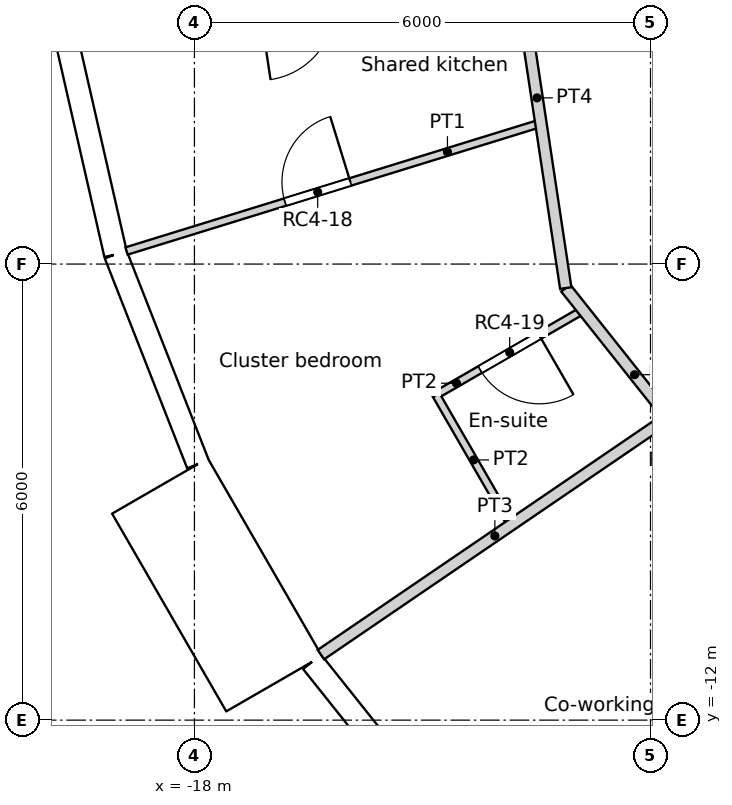
"""IFC4 building model, lengths in metres.
Left out: names, types, materials, properties, quantities, classifications, styles, units other than length and angle.
Written with IfcOpenShell. Run it as: python <this file> out.ifc"""

import sys

from ifc_helpers import new_model, si_unit, direction, frame, frame_2d, origin, origin_2d, place, context, subcontext, project, spatial, rectangle, circle, extrude, element, fill, save


model = new_model("IFC4")
c1 = context("Model", 3, precision=1e-05, world=origin(), true_north=direction((0.0, 1.0)))
c2 = subcontext(c1, "Body", "Model", "MODEL_VIEW")
j1 = project(units=[si_unit("LENGTHUNIT", "METRE"), si_unit("PLANEANGLEUNIT", "RADIAN")], contexts=[c1])
p1 = place(None, origin())
s1 = spatial("IfcSite", under=j1, at=p1, CompositionType="ELEMENT")
p2 = place(p1, origin())
s2 = spatial("IfcBuilding", under=s1, at=p2, CompositionType="ELEMENT")
p3 = place(p2, frame((0.0, 0.0, 263.4)))
s3 = spatial("IfcBuildingStorey", under=s2, at=p3, CompositionType="ELEMENT", Elevation=263.4)
for number, where, z_axis, x_axis in (
    (1, (-18.612, -2.805, 0.0), (0.0, 0.0, 1.0), (1.0, 0.0, 0.0)),
    (2, (-16.958, -8.167, 0.0), (0.0, 0.0, 1.0), (1.0, 0.0, 0.0)),
):
    element("IfcColumn", number, at=place(p3, frame(where, z_axis=z_axis, x_axis=x_axis)), inside=s3, PredefinedType="COLUMN", context=c2, shape_type="SweptSolid", body=[
        extrude(circle(Radius=0.55, at=origin_2d()), origin(), (0.0, 0.0, 1.0), 3.6),
    ])
p4 = place(p3, frame((-19.696, -2.984, 0.0), z_axis=(0.0, 0.0, 1.0), x_axis=(0.222529389789, -0.974925982155, 0.0)))
e3 = element("IfcWall", 3, at=p4, inside=s3, PredefinedType="SOLIDWALL", context=c2, shape_type="SweptSolid", body=[
    extrude(rectangle(XDim=2.962, YDim=0.3, at=frame_2d((1.481, 0.0))), origin(), (0.0, 0.0, 1.0), 3.25),
])
p5 = place(p4, frame((1.481, 0.0, 1.55)))
e4 = element("IfcOpeningElement", 4, at=p5, cuts=e3, PredefinedType="OPENING", context=c2, shape_type="SweptSolid", body=[
    extrude(circle(Radius=0.9, at=origin_2d()), frame((0.0, 0.16, 0.0), z_axis=(0.0, -1.0, 0.0), x_axis=(1.0, 0.0, 0.0)), (0.0, 0.0, 1.0), 0.32),
])
p6 = place(p3, frame((-19.037, -5.872, 0.0), z_axis=(0.0, 0.0, 1.0), x_axis=(0.36530043032, -0.930889679612, 0.0)))
e5 = element("IfcWall", 5, at=p6, inside=s3, PredefinedType="SOLIDWALL", context=c2, shape_type="SweptSolid", body=[
    extrude(rectangle(XDim=2.962, YDim=0.3, at=frame_2d((1.481, 0.0))), origin(), (0.0, 0.0, 1.0), 3.25),
])
p7 = place(p6, frame((1.481, 0.0, 1.55)))
e6 = element("IfcOpeningElement", 6, at=p7, cuts=e5, PredefinedType="OPENING", context=c2, shape_type="SweptSolid", body=[
    extrude(circle(Radius=0.9, at=origin_2d()), frame((0.0, 0.16, 0.0), z_axis=(0.0, -1.0, 0.0), x_axis=(1.0, 0.0, 0.0)), (0.0, 0.0, 1.0), 0.32),
])
p8 = place(p3, frame((-18.452, -8.921, -0.35), z_axis=(0.0, 0.0, 1.0), x_axis=(0.499990139034, -0.866031096941, 0.0)))
e7 = element("IfcWall", 7, at=p8, inside=s3, PredefinedType="ELEMENTEDWALL", context=c2, shape_type="SweptSolid", body=[
    extrude(rectangle(XDim=3.0, YDim=1.45, at=frame_2d((1.5, 0.0))), origin(), (0.0, 0.0, 1.0), 3.6),
])
p9 = place(p8, frame((1.5, 0.0, 1.9)))
e8 = element("IfcOpeningElement", 8, at=p9, cuts=e7, PredefinedType="OPENING", context=c2, shape_type="SweptSolid", body=[
    extrude(circle(Radius=0.9, at=origin_2d()), frame((0.0, 0.735, 0.0), z_axis=(0.0, -1.0, 0.0), x_axis=(1.0, 0.0, 0.0)), (0.0, 0.0, 1.0), 1.47),
])
p10 = place(p3, frame((-16.451, -11.234, 0.0), z_axis=(0.0, 0.0, 1.0), x_axis=(0.623498236992, -0.781824755599, 0.0)))
e9 = element("IfcWall", 9, at=p10, inside=s3, PredefinedType="SOLIDWALL", context=c2, shape_type="SweptSolid", body=[
    extrude(rectangle(XDim=2.962, YDim=0.3, at=frame_2d((1.481, 0.0))), origin(), (0.0, 0.0, 1.0), 3.25),
])
p11 = place(p10, frame((1.481, 0.0, 1.55)))
e10 = element("IfcOpeningElement", 10, at=p11, cuts=e9, PredefinedType="OPENING", context=c2, shape_type="SweptSolid", body=[
    extrude(circle(Radius=0.9, at=origin_2d()), frame((0.0, 0.16, 0.0), z_axis=(0.0, -1.0, 0.0), x_axis=(1.0, 0.0, 0.0)), (0.0, 0.0, 1.0), 0.32),
])
p12 = place(p3, frame((-14.394, 2.17, 0.0), z_axis=(0.0, 0.0, 1.0), x_axis=(0.149099970299, -0.988822127006, 0.0)))
e11 = element("IfcWall", 11, at=p12, inside=s3, PredefinedType="PARTITIONING", context=c2, shape_type="SweptSolid", body=[
    extrude(rectangle(XDim=8.582, YDim=0.15, at=frame_2d((4.291, 0.0))), origin(), (0.0, 0.0, 1.0), 3.25),
])
p13 = place(p12, frame((2.37, 0.0, 0.0)))
e12 = element("IfcOpeningElement", 12, at=p13, cuts=e11, PredefinedType="OPENING", context=c2, shape_type="SweptSolid", body=[
    extrude(rectangle(XDim=1.1, YDim=2.1, at=frame_2d((0.55, 1.05))), frame((0.0, 0.075, 0.0), z_axis=(0.0, -1.0, 0.0), x_axis=(1.0, 0.0, 0.0)), (0.0, 0.0, 1.0), 0.15),
])
p14 = place(p3, frame((-13.115, -6.316, 0.0), z_axis=(0.0, 0.0, 1.0), x_axis=(0.622042479172, -0.782983495423, 0.0)))
e13 = element("IfcWall", 13, at=p14, inside=s3, PredefinedType="PARTITIONING", context=c2, shape_type="SweptSolid", body=[
    extrude(rectangle(XDim=2.911, YDim=0.15, at=frame_2d((1.456, 0.0))), origin(), (0.0, 0.0, 1.0), 3.25),
])
p15 = place(p3, frame((-18.893, -5.828, 0.0), z_axis=(0.0, 0.0, 1.0), x_axis=(0.955552020905, 0.294822548908, 0.0)))
e14 = element("IfcWall", 14, at=p15, inside=s3, PredefinedType="PARTITIONING", context=c2, shape_type="SweptSolid", body=[
    extrude(rectangle(XDim=5.705, YDim=0.1, at=frame_2d((2.853, 0.0))), origin(), (0.0, 0.0, 1.0), 3.25),
])
p16 = place(p15, frame((2.182, 0.0, 0.0)))
e15 = element("IfcOpeningElement", 15, at=p16, cuts=e14, PredefinedType="OPENING", context=c2, shape_type="SweptSolid", body=[
    extrude(rectangle(XDim=0.9, YDim=2.1, at=frame_2d((0.45, 1.05))), frame((0.0, 0.05, 0.0), z_axis=(0.0, -1.0, 0.0), x_axis=(1.0, 0.0, 0.0)), (0.0, 0.0, 1.0), 0.1),
])
p17 = place(p3, frame((-14.82, -7.722, 0.0), z_axis=(0.0, 0.0, 1.0), x_axis=(0.866076416361, 0.499911633214, 0.0)))
e16 = element("IfcWall", 16, at=p17, inside=s3, PredefinedType="PARTITIONING", context=c2, shape_type="SweptSolid", body=[
    extrude(rectangle(XDim=2.234, YDim=0.1, at=frame_2d((1.117, 0.0))), origin(), (0.0, 0.0, 1.0), 3.25),
])
p18 = place(p17, frame((0.667, 0.0, 0.0)))
e17 = element("IfcOpeningElement", 17, at=p18, cuts=e16, PredefinedType="OPENING", context=c2, shape_type="SweptSolid", body=[
    extrude(rectangle(XDim=0.9, YDim=2.04, at=frame_2d((0.45, 1.02))), frame((0.0, 0.05, 0.0), z_axis=(0.0, -1.0, 0.0), x_axis=(1.0, 0.0, 0.0)), (0.0, 0.0, 1.0), 0.1),
])
p19 = place(p3, frame((-14.82, -7.722, 0.0), z_axis=(0.0, 0.0, 1.0), x_axis=(0.500143626598, -0.865942465048, 0.0)))
e18 = element("IfcWall", 18, at=p19, inside=s3, PredefinedType="PARTITIONING", context=c2, shape_type="SweptSolid", body=[
    extrude(rectangle(XDim=1.974, YDim=0.1, at=frame_2d((0.987, 0.0))), origin(), (0.0, 0.0, 1.0), 3.25),
])
p20 = place(p3, frame((-16.336, -11.138, 0.0), z_axis=(0.0, 0.0, 1.0), x_axis=(0.82615274451, 0.563446219917, 0.0)))
e19 = element("IfcWall", 19, at=p20, inside=s3, PredefinedType="PARTITIONING", context=c2, shape_type="SweptSolid", body=[
    extrude(rectangle(XDim=5.54, YDim=0.15, at=frame_2d((2.77, 0.0))), origin(), (0.0, 0.0, 1.0), 3.25),
])
p21 = place(p5, origin())
e20 = element("IfcWindow", 20, at=p21, inside=s3, PartitioningType="SINGLE_PANEL", PredefinedType="WINDOW", context=c2, shape_type="SweptSolid", body=[
    extrude(circle(Radius=0.9, at=origin_2d()), frame((0.0, 0.12, 0.0), z_axis=(0.0, -1.0, 0.0), x_axis=(1.0, 0.0, 0.0)), (0.0, 0.0, 1.0), 0.1),
])
fill(e4, e20)
p22 = place(p7, origin())
e21 = element("IfcWindow", 21, at=p22, inside=s3, PartitioningType="SINGLE_PANEL", PredefinedType="WINDOW", context=c2, shape_type="SweptSolid", body=[
    extrude(circle(Radius=0.9, at=origin_2d()), frame((0.0, 0.12, 0.0), z_axis=(0.0, -1.0, 0.0), x_axis=(1.0, 0.0, 0.0)), (0.0, 0.0, 1.0), 0.1),
])
fill(e6, e21)
p23 = place(p9, origin())
e22 = element("IfcWindow", 22, at=p23, inside=s3, PartitioningType="SINGLE_PANEL", PredefinedType="WINDOW", context=c2, shape_type="SweptSolid", body=[
    extrude(circle(Radius=0.9, at=origin_2d()), frame((0.0, 0.695, 0.0), z_axis=(0.0, -1.0, 0.0), x_axis=(1.0, 0.0, 0.0)), (0.0, 0.0, 1.0), 0.1),
])
fill(e8, e22)
p24 = place(p11, origin())
e23 = element("IfcWindow", 23, at=p24, inside=s3, PartitioningType="SINGLE_PANEL", PredefinedType="WINDOW", context=c2, shape_type="SweptSolid", body=[
    extrude(circle(Radius=0.9, at=origin_2d()), frame((0.0, 0.12, 0.0), z_axis=(0.0, -1.0, 0.0), x_axis=(1.0, 0.0, 0.0)), (0.0, 0.0, 1.0), 0.1),
])
fill(e10, e23)
p25 = place(p16, origin())
e24 = element("IfcDoor", 24, at=p25, inside=s3, OperationType="SINGLE_SWING_RIGHT", PredefinedType="DOOR", context=c2, shape_type="SweptSolid", body=[
    extrude(rectangle(XDim=0.9, YDim=2.1, at=frame_2d((0.45, 1.05))), frame((0.0, 0.025, 0.0), z_axis=(0.0, -1.0, 0.0), x_axis=(1.0, 0.0, 0.0)), (0.0, 0.0, 1.0), 0.05),
])
fill(e15, e24)
p26 = place(p18, origin())
e25 = element("IfcDoor", 25, at=p26, inside=s3, OperationType="SINGLE_SWING_LEFT", PredefinedType="DOOR", context=c2, shape_type="SweptSolid", body=[
    extrude(rectangle(XDim=0.9, YDim=2.04, at=frame_2d((0.45, 1.02))), frame((0.0, 0.025, 0.0), z_axis=(0.0, -1.0, 0.0), x_axis=(1.0, 0.0, 0.0)), (0.0, 0.0, 1.0), 0.05),
])
fill(e17, e25)
save(model, sys.argv[1])
